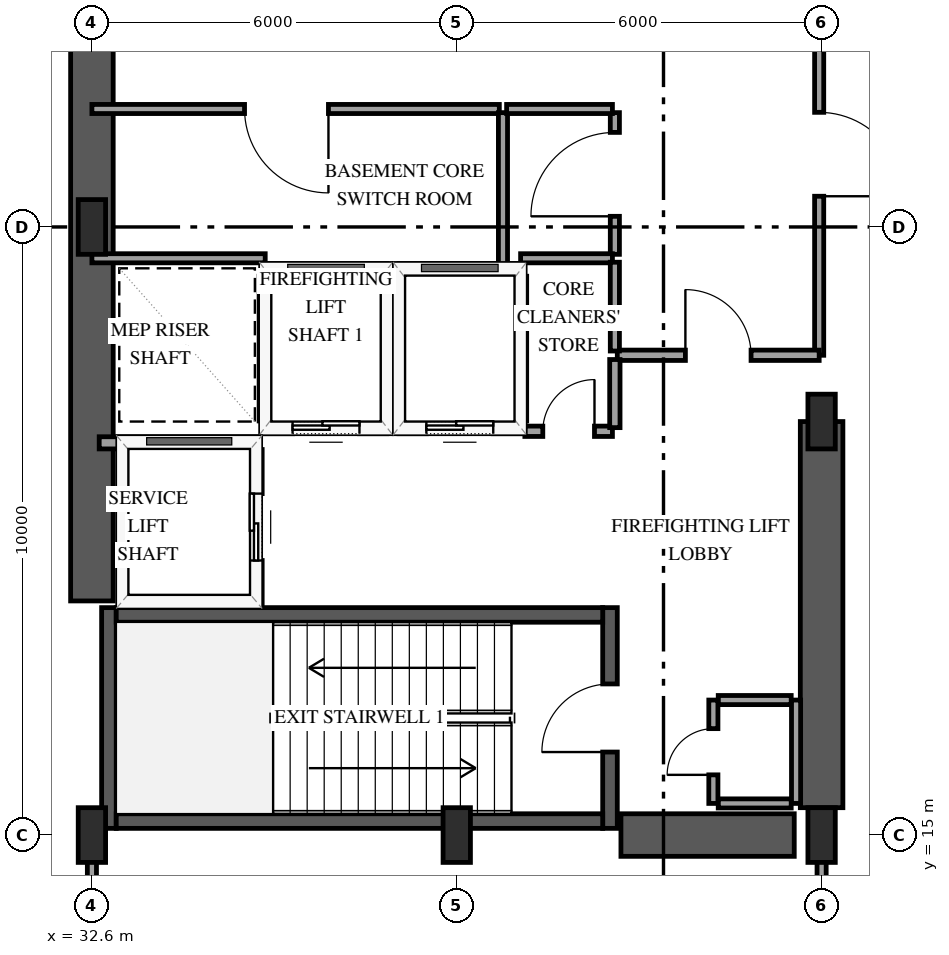
"""IFC4 building model, lengths in metres.
Left out: names, types, materials, properties, quantities, classifications, styles, units other than length and angle.
Written with IfcOpenShell. Run it as: python <this file> out.ifc"""

import sys

from ifc_helpers import new_model, si_unit, direction, frame, frame_2d, origin, origin_2d, place, context, subcontext, project, spatial, rectangle, extrude, element, fill, save


model = new_model("IFC4")
c1 = context("Model", 3, precision=1e-05, world=origin(), true_north=direction((0.0, 1.0)))
c2 = subcontext(c1, "Body", "Model", "MODEL_VIEW")
j1 = project(units=[si_unit("LENGTHUNIT", "METRE"), si_unit("PLANEANGLEUNIT", "RADIAN")], contexts=[c1])
p1 = place(None, origin())
s1 = spatial("IfcSite", under=j1, at=p1, CompositionType="ELEMENT")
p2 = place(p1, origin())
s2 = spatial("IfcBuilding", under=s1, at=p2, CompositionType="ELEMENT")
p3 = place(p2, frame((0.0, 0.0, -5.4)))
s3 = spatial("IfcBuildingStorey", under=s2, at=p3, CompositionType="ELEMENT", Elevation=-5.4)
p4 = place(p3, frame((32.88, 15.11, 0.0), z_axis=(0.0, 0.0, 1.0), x_axis=(0.0, 1.0, 0.0)))
e1 = element("IfcWall", 1, at=p4, inside=s3, PredefinedType="SHEAR", context=c2, shape_type="SweptSolid", body=[
    extrude(rectangle(XDim=3.63, YDim=0.24, at=frame_2d((1.815, 0.0))), origin(), (0.0, 0.0, 1.0), 5.4),
])
p5 = place(p3, frame((41.12, 15.11, 0.0), z_axis=(0.0, 0.0, 1.0), x_axis=(0.0, 1.0, 0.0)))
e2 = element("IfcWall", 2, at=p5, inside=s3, PredefinedType="SHEAR", context=c2, shape_type="SweptSolid", body=[
    extrude(rectangle(XDim=3.63, YDim=0.24, at=frame_2d((1.815, 0.0))), origin(), (0.0, 0.0, 1.0), 5.4),
])
p6 = place(p5, frame((1.255, 0.0, 0.0)))
e3 = element("IfcOpeningElement", 3, at=p6, cuts=e2, PredefinedType="OPENING", context=c2, shape_type="SweptSolid", body=[
    extrude(rectangle(XDim=1.12, YDim=2.15, at=frame_2d((0.56, 1.075))), frame((0.0, 0.13, 0.0), z_axis=(0.0, -1.0, 0.0), x_axis=(1.0, 0.0, 0.0)), (0.0, 0.0, 1.0), 0.26),
])
for number, where, z_axis, x_axis in (
    (4, (33.0, 15.23, 0.0), (0.0, 0.0, 1.0), (1.0, 0.0, 0.0)),
    (5, (33.0, 18.62, 0.0), (0.0, 0.0, 1.0), (1.0, 0.0, 0.0)),
):
    element("IfcWall", number, at=place(p3, frame(where, z_axis=z_axis, x_axis=x_axis)), inside=s3, PredefinedType="SHEAR", context=c2, shape_type="SweptSolid", body=[
        extrude(rectangle(XDim=8.0, YDim=0.24, at=frame_2d((4.0, 0.0))), origin(), (0.0, 0.0, 1.0), 5.4),
    ])
p7 = place(p3, frame((32.6, 18.85, 0.0), z_axis=(0.0, 0.0, 1.0), x_axis=(0.0, 1.0, 0.0)))
e6 = element("IfcWall", 6, at=p7, inside=s3, PredefinedType="SHEAR", context=c2, shape_type="SweptSolid", body=[
    extrude(rectangle(XDim=12.3, YDim=0.7, at=frame_2d((6.15, 0.0))), origin(), (0.0, 0.0, 1.0), 5.4),
])
p8 = place(p3, frame((41.3, 15.0, 0.0), z_axis=(0.0, 0.0, 1.0), x_axis=(1.0, 0.0, 0.0)))
e7 = element("IfcWall", 7, at=p8, inside=s3, PredefinedType="SHEAR", context=c2, shape_type="SweptSolid", body=[
    extrude(rectangle(XDim=2.85, YDim=0.7, at=frame_2d((1.425, 0.0))), origin(), (0.0, 0.0, 1.0), 5.4),
])
p9 = place(p3, frame((44.6, 15.45, 0.0), z_axis=(0.0, 0.0, 1.0), x_axis=(0.0, 1.0, 0.0)))
e8 = element("IfcWall", 8, at=p9, inside=s3, PredefinedType="SHEAR", context=c2, shape_type="SweptSolid", body=[
    extrude(rectangle(XDim=6.35, YDim=0.7, at=frame_2d((3.175, 0.0))), origin(), (0.0, 0.0, 1.0), 5.4),
])
for number, where, z_axis, x_axis in (
    (9, (32.6, 15.0, 0.0), (0.0, 0.0, 1.0), (1.0, 0.0, 0.0)),
    (10, (32.6, 25.0, 0.0), (0.0, 0.0, 1.0), (1.0, 0.0, 0.0)),
    (11, (38.6, 15.0, 0.0), (0.0, 0.0, 1.0), (1.0, 0.0, 0.0)),
    (12, (44.6, 15.0, 0.0), (0.0, 0.0, 1.0), (1.0, 0.0, 0.0)),
    (13, (44.6, 21.8, 0.0), (0.0, 0.0, 1.0), (1.0, 0.0, 0.0)),
):
    element("IfcColumn", number, at=place(p3, frame(where, z_axis=z_axis, x_axis=x_axis)), inside=s3, PredefinedType="PILASTER", context=c2, shape_type="SweptSolid", body=[
        extrude(rectangle(XDim=0.45, YDim=0.9, at=origin_2d()), origin(), (0.0, 0.0, 1.0), 5.4),
    ])
p10 = place(p3, frame((35.45, 21.7, 0.0), z_axis=(0.0, 0.0, 1.0), x_axis=(1.0, 0.0, 0.0)))
e14 = element("IfcWall", 14, at=p10, inside=s3, PredefinedType="SOLIDWALL", context=c2, shape_type="SweptSolid", body=[
    extrude(rectangle(XDim=2.0, YDim=0.2, at=frame_2d((1.0, 0.0))), origin(), (0.0, 0.0, 1.0), 5.08),
])
p11 = place(p10, frame((0.45, 0.0, 0.0)))
e15 = element("IfcOpeningElement", 15, at=p11, cuts=e14, PredefinedType="OPENING", context=c2, shape_type="SweptSolid", body=[
    extrude(rectangle(XDim=1.1, YDim=2.15, at=frame_2d((0.55, 1.075))), frame((0.0, 0.11, 0.0), z_axis=(0.0, -1.0, 0.0), x_axis=(1.0, 0.0, 0.0)), (0.0, 0.0, 1.0), 0.22),
])
p12 = place(p3, frame((35.45, 24.3, 0.0), z_axis=(0.0, 0.0, 1.0), x_axis=(1.0, 0.0, 0.0)))
e16 = element("IfcWall", 16, at=p12, inside=s3, PredefinedType="SOLIDWALL", context=c2, shape_type="SweptSolid", body=[
    extrude(rectangle(XDim=2.0, YDim=0.2, at=frame_2d((1.0, 0.0))), origin(), (0.0, 0.0, 1.0), 5.08),
])
for number, where, z_axis, x_axis in (
    (17, (35.45, 21.81, 0.0), (0.0, 0.0, 1.0), (0.0, 1.0, 0.0)),
    (18, (37.45, 21.81, 0.0), (0.0, 0.0, 1.0), (0.0, 1.0, 0.0)),
):
    element("IfcWall", number, at=place(p3, frame(where, z_axis=z_axis, x_axis=x_axis)), inside=s3, PredefinedType="SOLIDWALL", context=c2, shape_type="SweptSolid", body=[
        extrude(rectangle(XDim=2.38, YDim=0.2, at=frame_2d((1.19, 0.0))), origin(), (0.0, 0.0, 1.0), 5.08),
    ])
p13 = place(p3, frame((37.65, 21.7, 0.0), z_axis=(0.0, 0.0, 1.0), x_axis=(1.0, 0.0, 0.0)))
e19 = element("IfcWall", 19, at=p13, inside=s3, PredefinedType="SOLIDWALL", context=c2, shape_type="SweptSolid", body=[
    extrude(rectangle(XDim=2.0, YDim=0.2, at=frame_2d((1.0, 0.0))), origin(), (0.0, 0.0, 1.0), 5.08),
])
p14 = place(p13, frame((0.45, 0.0, 0.0)))
e20 = element("IfcOpeningElement", 20, at=p14, cuts=e19, PredefinedType="OPENING", context=c2, shape_type="SweptSolid", body=[
    extrude(rectangle(XDim=1.1, YDim=2.15, at=frame_2d((0.55, 1.075))), frame((0.0, 0.11, 0.0), z_axis=(0.0, -1.0, 0.0), x_axis=(1.0, 0.0, 0.0)), (0.0, 0.0, 1.0), 0.22),
])
p15 = place(p3, frame((37.65, 24.3, 0.0), z_axis=(0.0, 0.0, 1.0), x_axis=(1.0, 0.0, 0.0)))
e21 = element("IfcWall", 21, at=p15, inside=s3, PredefinedType="SOLIDWALL", context=c2, shape_type="SweptSolid", body=[
    extrude(rectangle(XDim=2.0, YDim=0.2, at=frame_2d((1.0, 0.0))), origin(), (0.0, 0.0, 1.0), 5.08),
])
p16 = place(p3, frame((39.65, 21.81, 0.0), z_axis=(0.0, 0.0, 1.0), x_axis=(0.0, 1.0, 0.0)))
e22 = element("IfcWall", 22, at=p16, inside=s3, PredefinedType="SOLIDWALL", context=c2, shape_type="SweptSolid", body=[
    extrude(rectangle(XDim=2.38, YDim=0.2, at=frame_2d((1.19, 0.0))), origin(), (0.0, 0.0, 1.0), 5.08),
])
p17 = place(p3, frame((32.72, 21.45, 0.0), z_axis=(0.0, 0.0, 1.0), x_axis=(1.0, 0.0, 0.0)))
e23 = element("IfcWall", 23, at=p17, inside=s3, PredefinedType="SOLIDWALL", context=c2, shape_type="SweptSolid", body=[
    extrude(rectangle(XDim=2.58, YDim=0.2, at=frame_2d((1.29, 0.0))), origin(), (0.0, 0.0, 1.0), 5.08),
])
p18 = place(p3, frame((35.3, 18.79, 0.0), z_axis=(0.0, 0.0, 1.0), x_axis=(0.0, 1.0, 0.0)))
e24 = element("IfcWall", 24, at=p18, inside=s3, PredefinedType="SOLIDWALL", context=c2, shape_type="SweptSolid", body=[
    extrude(rectangle(XDim=2.55, YDim=0.2, at=frame_2d((1.275, 0.0))), origin(), (0.0, 0.0, 1.0), 5.08),
])
p19 = place(p18, frame((0.725, 0.0, 0.0)))
e25 = element("IfcOpeningElement", 25, at=p19, cuts=e24, PredefinedType="OPENING", context=c2, shape_type="SweptSolid", body=[
    extrude(rectangle(XDim=1.1, YDim=2.15, at=frame_2d((0.55, 1.075))), frame((0.0, 0.11, 0.0), z_axis=(0.0, -1.0, 0.0), x_axis=(1.0, 0.0, 0.0)), (0.0, 0.0, 1.0), 0.22),
])
for number, where, z_axis, x_axis in (
    (26, (42.9, 15.52, 0.0), (0.0, 0.0, 1.0), (1.0, 0.0, 0.0)),
    (27, (42.9, 17.22, 0.0), (0.0, 0.0, 1.0), (1.0, 0.0, 0.0)),
):
    element("IfcWall", number, at=place(p3, frame(where, z_axis=z_axis, x_axis=x_axis)), inside=s3, PredefinedType="PARTITIONING", context=c2, shape_type="SweptSolid", body=[
        extrude(rectangle(XDim=1.2, YDim=0.15, at=frame_2d((0.6, 0.0))), origin(), (0.0, 0.0, 1.0), 5.08),
    ])
p20 = place(p3, frame((44.18, 15.52, 0.0), z_axis=(0.0, 0.0, 1.0), x_axis=(0.0, 1.0, 0.0)))
e28 = element("IfcWall", 28, at=p20, inside=s3, PredefinedType="PARTITIONING", context=c2, shape_type="SweptSolid", body=[
    extrude(rectangle(XDim=1.7, YDim=0.15, at=frame_2d((0.85, 0.0))), origin(), (0.0, 0.0, 1.0), 5.08),
])
p21 = place(p3, frame((42.82, 15.52, 0.0), z_axis=(0.0, 0.0, 1.0), x_axis=(0.0, 1.0, 0.0)))
e29 = element("IfcWall", 29, at=p21, inside=s3, PredefinedType="PARTITIONING", context=c2, shape_type="SweptSolid", body=[
    extrude(rectangle(XDim=1.7, YDim=0.15, at=frame_2d((0.85, 0.0))), origin(), (0.0, 0.0, 1.0), 5.08),
])
p22 = place(p21, frame((0.47, 0.0, 0.0)))
e30 = element("IfcOpeningElement", 30, at=p22, cuts=e29, PredefinedType="OPENING", context=c2, shape_type="SweptSolid", body=[
    extrude(rectangle(XDim=0.76, YDim=2.0, at=frame_2d((0.38, 1.0))), frame((0.0, 0.085, 0.0), z_axis=(0.0, -1.0, 0.0), x_axis=(1.0, 0.0, 0.0)), (0.0, 0.0, 1.0), 0.17),
])
p23 = place(p3, frame((32.6, 14.93, 0.0), z_axis=(0.0, 0.0, 1.0), x_axis=(0.0, -1.0, 0.0)))
e31 = element("IfcWall", 31, at=p23, inside=s3, PredefinedType="PARTITIONING", context=c2, shape_type="SweptSolid", body=[
    extrude(rectangle(XDim=7.86, YDim=0.15, at=frame_2d((3.93, 0.0))), origin(), (0.0, 0.0, 1.0), 4.202),
])
p24 = place(p3, frame((44.56, 29.8, 0.0), z_axis=(0.0, 0.0, 1.0), x_axis=(0.0, -1.0, 0.0)))
e32 = element("IfcWall", 32, at=p24, inside=s3, PredefinedType="PARTITIONING", context=c2, shape_type="SweptSolid", body=[
    extrude(rectangle(XDim=6.91, YDim=0.15, at=frame_2d((3.455, 0.0))), origin(), (0.0, 0.0, 1.0), 4.12),
])
p25 = place(p24, frame((2.915, 0.0, 0.0)))
e33 = element("IfcOpeningElement", 33, at=p25, cuts=e32, PredefinedType="OPENING", context=c2, shape_type="SweptSolid", body=[
    extrude(rectangle(XDim=1.38, YDim=2.2, at=frame_2d((0.69, 1.1))), frame((0.0, 0.085, 0.0), z_axis=(0.0, -1.0, 0.0), x_axis=(1.0, 0.0, 0.0)), (0.0, 0.0, 1.0), 0.17),
])
p26 = place(p3, frame((39.3, 26.94, 0.0), z_axis=(0.0, 0.0, 1.0), x_axis=(-1.0, 0.0, 0.0)))
e34 = element("IfcWall", 34, at=p26, inside=s3, PredefinedType="PARTITIONING", context=c2, shape_type="SweptSolid", body=[
    extrude(rectangle(XDim=6.7, YDim=0.15, at=frame_2d((3.35, 0.0))), origin(), (0.0, 0.0, 1.0), 5.08),
])
p27 = place(p26, frame((2.81, 0.0, 0.0)))
e35 = element("IfcOpeningElement", 35, at=p27, cuts=e34, PredefinedType="OPENING", context=c2, shape_type="SweptSolid", body=[
    extrude(rectangle(XDim=1.38, YDim=2.2, at=frame_2d((0.69, 1.1))), frame((0.0, 0.085, 0.0), z_axis=(0.0, -1.0, 0.0), x_axis=(1.0, 0.0, 0.0)), (0.0, 0.0, 1.0), 0.17),
])
p28 = place(p3, frame((41.24, 22.89, 0.0), z_axis=(0.0, 0.0, 1.0), x_axis=(1.0, 0.0, 0.0)))
e36 = element("IfcWall", 36, at=p28, inside=s3, PredefinedType="PARTITIONING", context=c2, shape_type="SweptSolid", body=[
    extrude(rectangle(XDim=3.32, YDim=0.17, at=frame_2d((1.66, 0.0))), origin(), (0.0, 0.0, 1.0), 5.08),
])
p29 = place(p28, frame((1.12, 0.0, 0.0)))
e37 = element("IfcOpeningElement", 37, at=p29, cuts=e36, PredefinedType="OPENING", context=c2, shape_type="SweptSolid", body=[
    extrude(rectangle(XDim=1.08, YDim=2.15, at=frame_2d((0.54, 1.075))), frame((0.0, 0.095, 0.0), z_axis=(0.0, -1.0, 0.0), x_axis=(1.0, 0.0, 0.0)), (0.0, 0.0, 1.0), 0.19),
])
p30 = place(p3, frame((44.6, 11.87, 0.0), z_axis=(0.0, 0.0, 1.0), x_axis=(0.0, 1.0, 0.0)))
e38 = element("IfcWall", 38, at=p30, inside=s3, PredefinedType="PARTITIONING", context=c2, shape_type="SweptSolid", body=[
    extrude(rectangle(XDim=3.06, YDim=0.15, at=frame_2d((1.53, 0.0))), origin(), (0.0, 0.0, 1.0), 4.202),
])
p31 = place(p3, frame((35.45, 24.485, 0.0), z_axis=(0.0, 0.0, 1.0), x_axis=(-1.0, 0.0, 0.0)))
e39 = element("IfcWall", 39, at=p31, inside=s3, PredefinedType="PARTITIONING", context=c2, shape_type="SweptSolid", body=[
    extrude(rectangle(XDim=2.85, YDim=0.15, at=frame_2d((1.425, 0.0))), origin(), (0.0, 0.0, 1.0), 5.08),
])
p32 = place(p3, frame((39.36, 24.3, 0.0), z_axis=(0.0, 0.0, 1.0), x_axis=(0.0, 1.0, 0.0)))
e40 = element("IfcWall", 40, at=p32, inside=s3, PredefinedType="PARTITIONING", context=c2, shape_type="SweptSolid", body=[
    extrude(rectangle(XDim=2.58, YDim=0.15, at=frame_2d((1.29, 0.0))), origin(), (0.0, 0.0, 1.0), 5.08),
])
p33 = place(p3, frame((41.2, 24.55, 0.0), z_axis=(0.0, 0.0, 1.0), x_axis=(0.0, 1.0, 0.0)))
e41 = element("IfcWall", 41, at=p33, inside=s3, PredefinedType="PARTITIONING", context=c2, shape_type="SweptSolid", body=[
    extrude(rectangle(XDim=2.33, YDim=0.15, at=frame_2d((1.165, 0.0))), origin(), (0.0, 0.0, 1.0), 5.08),
])
p34 = place(p33, frame((0.625, 0.0, 0.0)))
e42 = element("IfcOpeningElement", 42, at=p34, cuts=e41, PredefinedType="OPENING", context=c2, shape_type="SweptSolid", body=[
    extrude(rectangle(XDim=1.38, YDim=2.2, at=frame_2d((0.69, 1.1))), frame((0.0, 0.085, 0.0), z_axis=(0.0, -1.0, 0.0), x_axis=(1.0, 0.0, 0.0)), (0.0, 0.0, 1.0), 0.17),
])
p35 = place(p3, frame((41.16, 26.94, 0.0), z_axis=(0.0, 0.0, 1.0), x_axis=(-1.0, 0.0, 0.0)))
e43 = element("IfcWall", 43, at=p35, inside=s3, PredefinedType="PARTITIONING", context=c2, shape_type="SweptSolid", body=[
    extrude(rectangle(XDim=1.74, YDim=0.15, at=frame_2d((0.87, 0.0))), origin(), (0.0, 0.0, 1.0), 5.08),
])
p36 = place(p3, frame((39.65, 24.485, 0.0), z_axis=(0.0, 0.0, 1.0), x_axis=(1.0, 0.0, 0.0)))
e44 = element("IfcWall", 44, at=p36, inside=s3, PredefinedType="PARTITIONING", context=c2, shape_type="SweptSolid", body=[
    extrude(rectangle(XDim=1.51, YDim=0.15, at=frame_2d((0.755, 0.0))), origin(), (0.0, 0.0, 1.0), 5.08),
])
p37 = place(p3, frame((41.2, 22.96, 0.0), z_axis=(0.0, 0.0, 1.0), x_axis=(0.0, 1.0, 0.0)))
e45 = element("IfcWall", 45, at=p37, inside=s3, PredefinedType="PARTITIONING", context=c2, shape_type="SweptSolid", body=[
    extrude(rectangle(XDim=1.46, YDim=0.15, at=frame_2d((0.73, 0.0))), origin(), (0.0, 0.0, 1.0), 5.08),
])
p38 = place(p3, frame((39.72, 21.64, 0.0), z_axis=(0.0, 0.0, 1.0), x_axis=(1.0, 0.0, 0.0)))
e46 = element("IfcWall", 46, at=p38, inside=s3, PredefinedType="PARTITIONING", context=c2, shape_type="SweptSolid", body=[
    extrude(rectangle(XDim=1.44, YDim=0.17, at=frame_2d((0.72, 0.0))), origin(), (0.0, 0.0, 1.0), 5.08),
])
p39 = place(p38, frame((0.295, 0.0, 0.0)))
e47 = element("IfcOpeningElement", 47, at=p39, cuts=e46, PredefinedType="OPENING", context=c2, shape_type="SweptSolid", body=[
    extrude(rectangle(XDim=0.85, YDim=2.1, at=frame_2d((0.425, 1.05))), frame((0.0, 0.095, 0.0), z_axis=(0.0, -1.0, 0.0), x_axis=(1.0, 0.0, 0.0)), (0.0, 0.0, 1.0), 0.19),
])
p40 = place(p3, frame((41.2, 21.7, 0.0), z_axis=(0.0, 0.0, 1.0), x_axis=(0.0, 1.0, 0.0)))
e48 = element("IfcWall", 48, at=p40, inside=s3, PredefinedType="PARTITIONING", context=c2, shape_type="SweptSolid", body=[
    extrude(rectangle(XDim=1.12, YDim=0.17, at=frame_2d((0.56, 0.0))), origin(), (0.0, 0.0, 1.0), 5.08),
])
p41 = place(p11, origin())
e49 = element("IfcDoor", 49, at=p41, inside=s3, OperationType="SLIDING_TO_LEFT", PredefinedType="DOOR", context=c2, shape_type="SweptSolid", body=[
    extrude(rectangle(XDim=1.1, YDim=2.15, at=frame_2d((0.55, 1.075))), frame((0.0, 0.025, 0.0), z_axis=(0.0, -1.0, 0.0), x_axis=(1.0, 0.0, 0.0)), (0.0, 0.0, 1.0), 0.05),
])
fill(e15, e49)
p42 = place(p14, origin())
e50 = element("IfcDoor", 50, at=p42, inside=s3, OperationType="SLIDING_TO_LEFT", PredefinedType="DOOR", context=c2, shape_type="SweptSolid", body=[
    extrude(rectangle(XDim=1.1, YDim=2.15, at=frame_2d((0.55, 1.075))), frame((0.0, 0.025, 0.0), z_axis=(0.0, -1.0, 0.0), x_axis=(1.0, 0.0, 0.0)), (0.0, 0.0, 1.0), 0.05),
])
fill(e20, e50)
p43 = place(p19, origin())
e51 = element("IfcDoor", 51, at=p43, inside=s3, OperationType="SLIDING_TO_LEFT", PredefinedType="DOOR", context=c2, shape_type="SweptSolid", body=[
    extrude(rectangle(XDim=1.1, YDim=2.15, at=frame_2d((0.55, 1.075))), frame((0.0, 0.025, 0.0), z_axis=(0.0, -1.0, 0.0), x_axis=(1.0, 0.0, 0.0)), (0.0, 0.0, 1.0), 0.05),
])
fill(e25, e51)
p44 = place(p6, origin())
e52 = element("IfcDoor", 52, at=p44, inside=s3, OperationType="SINGLE_SWING_LEFT", PredefinedType="DOOR", context=c2, shape_type="SweptSolid", body=[
    extrude(rectangle(XDim=1.12, YDim=2.15, at=frame_2d((0.56, 1.075))), frame((0.0, 0.025, 0.0), z_axis=(0.0, -1.0, 0.0), x_axis=(1.0, 0.0, 0.0)), (0.0, 0.0, 1.0), 0.05),
])
fill(e3, e52)
p45 = place(p22, origin())
e53 = element("IfcDoor", 53, at=p45, inside=s3, OperationType="SINGLE_SWING_LEFT", PredefinedType="TRAPDOOR", context=c2, shape_type="SweptSolid", body=[
    extrude(rectangle(XDim=0.76, YDim=2.0, at=frame_2d((0.38, 1.0))), frame((0.0, 0.025, 0.0), z_axis=(0.0, -1.0, 0.0), x_axis=(1.0, 0.0, 0.0)), (0.0, 0.0, 1.0), 0.05),
])
fill(e30, e53)
p46 = place(p25, origin())
e54 = element("IfcDoor", 54, at=p46, inside=s3, OperationType="SINGLE_SWING_RIGHT", PredefinedType="DOOR", context=c2, shape_type="SweptSolid", body=[
    extrude(rectangle(XDim=1.38, YDim=2.2, at=frame_2d((0.69, 1.1))), frame((0.0, 0.025, 0.0), z_axis=(0.0, -1.0, 0.0), x_axis=(1.0, 0.0, 0.0)), (0.0, 0.0, 1.0), 0.05),
])
fill(e33, e54)
p47 = place(p27, origin())
e55 = element("IfcDoor", 55, at=p47, inside=s3, OperationType="SINGLE_SWING_LEFT", PredefinedType="DOOR", context=c2, shape_type="SweptSolid", body=[
    extrude(rectangle(XDim=1.38, YDim=2.2, at=frame_2d((0.69, 1.1))), frame((0.0, 0.025, 0.0), z_axis=(0.0, -1.0, 0.0), x_axis=(1.0, 0.0, 0.0)), (0.0, 0.0, 1.0), 0.05),
])
fill(e35, e55)
p48 = place(p29, origin())
e56 = element("IfcDoor", 56, at=p48, inside=s3, OperationType="SINGLE_SWING_LEFT", PredefinedType="DOOR", context=c2, shape_type="SweptSolid", body=[
    extrude(rectangle(XDim=1.08, YDim=2.15, at=frame_2d((0.54, 1.075))), frame((0.0, 0.025, 0.0), z_axis=(0.0, -1.0, 0.0), x_axis=(1.0, 0.0, 0.0)), (0.0, 0.0, 1.0), 0.05),
])
fill(e37, e56)
p49 = place(p34, origin())
e57 = element("IfcDoor", 57, at=p49, inside=s3, OperationType="SINGLE_SWING_LEFT", PredefinedType="DOOR", context=c2, shape_type="SweptSolid", body=[
    extrude(rectangle(XDim=1.38, YDim=2.2, at=frame_2d((0.69, 1.1))), frame((0.0, 0.025, 0.0), z_axis=(0.0, -1.0, 0.0), x_axis=(1.0, 0.0, 0.0)), (0.0, 0.0, 1.0), 0.05),
])
fill(e42, e57)
p50 = place(p39, origin())
e58 = element("IfcDoor", 58, at=p50, inside=s3, OperationType="SINGLE_SWING_RIGHT", PredefinedType="DOOR", context=c2, shape_type="SweptSolid", body=[
    extrude(rectangle(XDim=0.85, YDim=2.1, at=frame_2d((0.425, 1.05))), frame((0.0, 0.025, 0.0), z_axis=(0.0, -1.0, 0.0), x_axis=(1.0, 0.0, 0.0)), (0.0, 0.0, 1.0), 0.05),
])
fill(e47, e58)
save(model, sys.argv[1])
